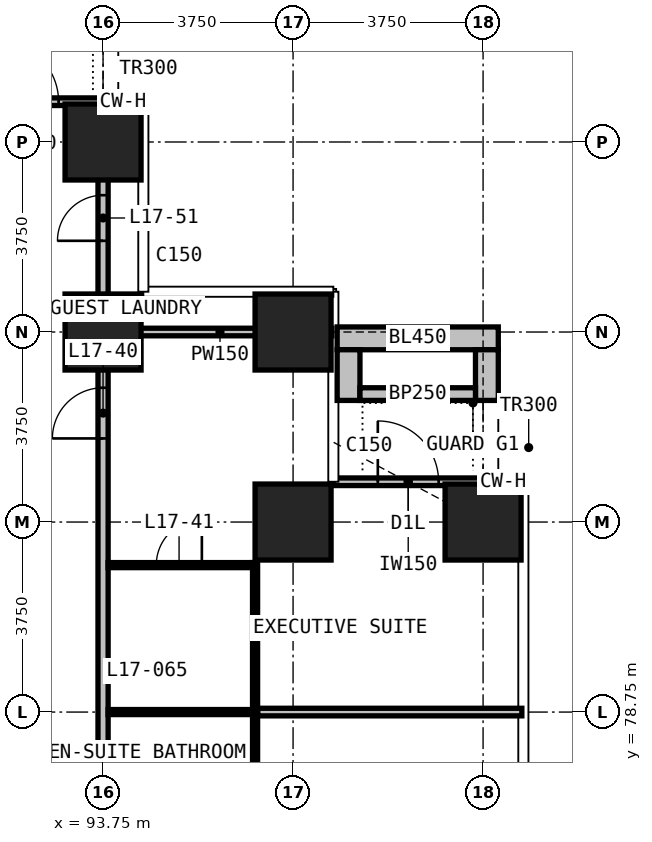
"""IFC4 building model, lengths in metres.
Left out: names, types, materials, properties, quantities, classifications, styles, units other than length and angle.
Written with IfcOpenShell. Run it as: python <this file> out.ifc"""

import sys

from ifc_helpers import new_model, si_unit, direction, frame, frame_2d, origin, origin_2d, place, context, subcontext, project, spatial, rectangle, extrude, element, fill, save


model = new_model("IFC4")
c1 = context("Model", 3, precision=1e-05, world=origin(), true_north=direction((0.0, 1.0)))
c2 = subcontext(c1, "Body", "Model", "MODEL_VIEW")
j1 = project(units=[si_unit("LENGTHUNIT", "METRE"), si_unit("PLANEANGLEUNIT", "RADIAN")], contexts=[c1])
p1 = place(None, origin())
s1 = spatial("IfcSite", under=j1, at=p1, CompositionType="ELEMENT")
p2 = place(p1, origin())
s2 = spatial("IfcBuilding", under=s1, at=p2, CompositionType="ELEMENT")
p3 = place(p2, frame((0.0, 0.0, 75.8)))
s3 = spatial("IfcBuildingStorey", under=s2, at=p3, CompositionType="ELEMENT", Elevation=75.8)
for number, where, z_axis, x_axis in (
    (1, (93.75, 86.25, 0.0), (0.0, 0.0, 1.0), (1.0, 0.0, 0.0)),
    (2, (93.75, 90.0, 0.0), (0.0, 0.0, 1.0), (1.0, 0.0, 0.0)),
    (3, (97.5, 82.5, 0.0), (0.0, 0.0, 1.0), (1.0, 0.0, 0.0)),
    (4, (97.5, 86.25, 0.0), (0.0, 0.0, 1.0), (1.0, 0.0, 0.0)),
    (5, (101.25, 82.5, 0.0), (0.0, 0.0, 1.0), (1.0, 0.0, 0.0)),
):
    element("IfcColumn", number, at=place(p3, frame(where, z_axis=z_axis, x_axis=x_axis)), inside=s3, PredefinedType="COLUMN", context=c2, shape_type="SweptSolid", body=[
        extrude(rectangle(XDim=1.5, YDim=1.5, at=origin_2d()), origin(), (0.0, 0.0, 1.0), 3.3),
    ])
p4 = place(p3, frame((98.295, 83.295, 0.0), z_axis=(0.0, 0.0, 1.0), x_axis=(1.0, 0.0, 0.0)))
e6 = element("IfcWall", 6, at=p4, inside=s3, PredefinedType="SOLIDWALL", context=c2, shape_type="SweptSolid", body=[
    extrude(rectangle(XDim=2.955, YDim=0.15, at=frame_2d((1.478, 0.0))), origin(), (0.0, 0.0, 1.0), 3.0),
])
p5 = place(p4, frame((0.877, 0.0, 0.0)))
e7 = element("IfcOpeningElement", 7, at=p5, cuts=e6, PredefinedType="OPENING", context=c2, shape_type="SweptSolid", body=[
    extrude(rectangle(XDim=1.2, YDim=2.0, at=frame_2d((0.6, 1.0))), frame((0.0, 0.085, 0.0), z_axis=(0.0, -1.0, 0.0), x_axis=(1.0, 0.0, 0.0)), (0.0, 0.0, 1.0), 0.17),
])
p6 = place(p3, frame((90.795, 90.795, 0.0), z_axis=(0.0, 0.0, 1.0), x_axis=(1.0, 0.0, 0.0)))
e8 = element("IfcWall", 8, at=p6, inside=s3, PredefinedType="SOLIDWALL", context=c2, shape_type="SweptSolid", body=[
    extrude(rectangle(XDim=2.955, YDim=0.15, at=frame_2d((1.478, 0.0))), origin(), (0.0, 0.0, 1.0), 3.0),
])
p7 = place(p6, frame((0.877, 0.0, 0.0)))
e9 = element("IfcOpeningElement", 9, at=p7, cuts=e8, PredefinedType="OPENING", context=c2, shape_type="SweptSolid", body=[
    extrude(rectangle(XDim=1.2, YDim=2.4, at=frame_2d((0.6, 1.2))), frame((0.0, 0.085, 0.0), z_axis=(0.0, -1.0, 0.0), x_axis=(1.0, 0.0, 0.0)), (0.0, 0.0, 1.0), 0.17),
])
p8 = place(p3, frame((98.37, 86.125, 0.0), z_axis=(0.0, 0.0, 1.0), x_axis=(1.0, 0.0, 0.0)))
e10 = element("IfcWall", 10, at=p8, inside=s3, PredefinedType="USERDEFINED", context=c2, shape_type="SweptSolid", body=[
    extrude(rectangle(XDim=3.18, YDim=0.45, at=frame_2d((1.59, 0.0))), origin(), (0.0, 0.0, 1.0), 1.1),
])
for number, where, z_axis, x_axis in (
    (11, (98.595, 84.9, 0.0), (0.0, 0.0, 1.0), (0.0, 1.0, 0.0)),
    (12, (101.325, 84.9, 0.0), (0.0, 0.0, 1.0), (0.0, 1.0, 0.0)),
):
    element("IfcWall", number, at=place(p3, frame(where, z_axis=z_axis, x_axis=x_axis)), inside=s3, PredefinedType="USERDEFINED", context=c2, shape_type="SweptSolid", body=[
        extrude(rectangle(XDim=1.0, YDim=0.45, at=frame_2d((0.5, 0.0))), origin(), (0.0, 0.0, 1.0), 1.1),
    ])
p9 = place(p3, frame((98.82, 85.025, 0.0), z_axis=(0.0, 0.0, 1.0), x_axis=(1.0, 0.0, 0.0)))
e13 = element("IfcWall", 13, at=p9, inside=s3, PredefinedType="USERDEFINED", context=c2, shape_type="SweptSolid", body=[
    extrude(rectangle(XDim=2.28, YDim=0.25, at=frame_2d((1.14, 0.0))), origin(), (0.0, 0.0, 1.0), 1.0),
])
p10 = place(p3, frame((93.75, 52.4, 0.0), z_axis=(0.0, 0.0, 1.0), x_axis=(0.0, 1.0, 0.0)))
e14 = element("IfcWall", 14, at=p10, inside=s3, PredefinedType="PARTITIONING", context=c2, shape_type="SweptSolid", body=[
    extrude(rectangle(XDim=38.31, YDim=0.2, at=frame_2d((19.155, 0.0))), origin(), (0.0, 0.0, 1.0), 3.0),
])
p11 = place(p10, frame((2.35, 0.0, 0.0)))
e15 = element("IfcOpeningElement", 15, at=p11, cuts=e14, PredefinedType="OPENING", context=c2, shape_type="SweptSolid", body=[
    extrude(rectangle(XDim=1.0, YDim=2.2, at=frame_2d((0.5, 1.1))), frame((0.0, 0.11, 0.0), z_axis=(0.0, -1.0, 0.0), x_axis=(1.0, 0.0, 0.0)), (0.0, 0.0, 1.0), 0.22),
])
p12 = place(p10, frame((4.95, 0.0, 0.0)))
e16 = element("IfcOpeningElement", 16, at=p12, cuts=e14, PredefinedType="OPENING", context=c2, shape_type="SweptSolid", body=[
    extrude(rectangle(XDim=1.0, YDim=2.2, at=frame_2d((0.5, 1.1))), frame((0.0, 0.11, 0.0), z_axis=(0.0, -1.0, 0.0), x_axis=(1.0, 0.0, 0.0)), (0.0, 0.0, 1.0), 0.22),
])
p13 = place(p10, frame((16.75, 0.0, 0.0)))
e17 = element("IfcOpeningElement", 17, at=p13, cuts=e14, PredefinedType="OPENING", context=c2, shape_type="SweptSolid", body=[
    extrude(rectangle(XDim=1.0, YDim=2.2, at=frame_2d((0.5, 1.1))), frame((0.0, 0.11, 0.0), z_axis=(0.0, -1.0, 0.0), x_axis=(1.0, 0.0, 0.0)), (0.0, 0.0, 1.0), 0.22),
])
p14 = place(p10, frame((19.95, 0.0, 0.0)))
e18 = element("IfcOpeningElement", 18, at=p14, cuts=e14, PredefinedType="OPENING", context=c2, shape_type="SweptSolid", body=[
    extrude(rectangle(XDim=1.0, YDim=2.2, at=frame_2d((0.5, 1.1))), frame((0.0, 0.11, 0.0), z_axis=(0.0, -1.0, 0.0), x_axis=(1.0, 0.0, 0.0)), (0.0, 0.0, 1.0), 0.22),
])
p15 = place(p10, frame((31.75, 0.0, 0.0)))
e19 = element("IfcOpeningElement", 19, at=p15, cuts=e14, PredefinedType="OPENING", context=c2, shape_type="SweptSolid", body=[
    extrude(rectangle(XDim=1.0, YDim=2.2, at=frame_2d((0.5, 1.1))), frame((0.0, 0.11, 0.0), z_axis=(0.0, -1.0, 0.0), x_axis=(1.0, 0.0, 0.0)), (0.0, 0.0, 1.0), 0.22),
])
p16 = place(p10, frame((35.65, 0.0, 0.0)))
e20 = element("IfcOpeningElement", 20, at=p16, cuts=e14, PredefinedType="OPENING", context=c2, shape_type="SweptSolid", body=[
    extrude(rectangle(XDim=0.9, YDim=2.2, at=frame_2d((0.45, 1.1))), frame((0.0, 0.11, 0.0), z_axis=(0.0, -1.0, 0.0), x_axis=(1.0, 0.0, 0.0)), (0.0, 0.0, 1.0), 0.22),
])
p17 = place(p3, frame((96.8, 78.75, 0.0), z_axis=(0.0, 0.0, 1.0), x_axis=(1.0, 0.0, 0.0)))
e21 = element("IfcWall", 21, at=p17, inside=s3, PredefinedType="PARTITIONING", context=c2, shape_type="SweptSolid", body=[
    extrude(rectangle(XDim=5.215, YDim=0.15, at=frame_2d((2.607, 0.0))), origin(), (0.0, 0.0, 1.0), 3.0),
])
p18 = place(p3, frame((93.85, 86.25, 0.0), z_axis=(0.0, 0.0, 1.0), x_axis=(1.0, 0.0, 0.0)))
e22 = element("IfcWall", 22, at=p18, inside=s3, PredefinedType="PARTITIONING", context=c2, shape_type="SweptSolid", body=[
    extrude(rectangle(XDim=4.415, YDim=0.15, at=frame_2d((2.208, 0.0))), origin(), (0.0, 0.0, 1.0), 3.0),
])
p19 = place(p3, frame((93.85, 78.75, 0.0), z_axis=(0.0, 0.0, 1.0), x_axis=(1.0, 0.0, 0.0)))
e23 = element("IfcWall", 23, at=p19, inside=s3, PredefinedType="PARTITIONING", context=c2, shape_type="SweptSolid", body=[
    extrude(rectangle(XDim=2.85, YDim=0.1, at=frame_2d((1.425, 0.0))), origin(), (0.0, 0.0, 1.0), 3.0),
])
p20 = place(p3, frame((93.85, 81.65, 0.0), z_axis=(0.0, 0.0, 1.0), x_axis=(1.0, 0.0, 0.0)))
e24 = element("IfcWall", 24, at=p20, inside=s3, PredefinedType="PARTITIONING", context=c2, shape_type="SweptSolid", body=[
    extrude(rectangle(XDim=2.85, YDim=0.1, at=frame_2d((1.425, 0.0))), origin(), (0.0, 0.0, 1.0), 3.0),
])
p21 = place(p20, frame((0.95, 0.0, 0.0)))
e25 = element("IfcOpeningElement", 25, at=p21, cuts=e24, PredefinedType="OPENING", context=c2, shape_type="SweptSolid", body=[
    extrude(rectangle(XDim=0.9, YDim=2.2, at=frame_2d((0.45, 1.1))), frame((0.0, 0.06, 0.0), z_axis=(0.0, -1.0, 0.0), x_axis=(1.0, 0.0, 0.0)), (0.0, 0.0, 1.0), 0.12),
])
p22 = place(p3, frame((96.75, 75.8, 0.0), z_axis=(0.0, 0.0, 1.0), x_axis=(0.0, 1.0, 0.0)))
e26 = element("IfcWall", 26, at=p22, inside=s3, PredefinedType="PARTITIONING", context=c2, shape_type="SweptSolid", body=[
    extrude(rectangle(XDim=5.9, YDim=0.1, at=frame_2d((2.95, 0.0))), origin(), (0.0, 0.0, 1.0), 3.0),
])
p23 = place(p5, origin())
e27 = element("IfcDoor", 27, at=p23, inside=s3, OperationType="SINGLE_SWING_LEFT", PredefinedType="DOOR", context=c2, shape_type="SweptSolid", body=[
    extrude(rectangle(XDim=1.2, YDim=2.0, at=frame_2d((0.6, 1.0))), frame((0.0, 0.025, 0.0), z_axis=(0.0, -1.0, 0.0), x_axis=(1.0, 0.0, 0.0)), (0.0, 0.0, 1.0), 0.05),
])
fill(e7, e27)
p24 = place(p7, origin())
e28 = element("IfcDoor", 28, at=p24, inside=s3, OperationType="SINGLE_SWING_LEFT", PredefinedType="DOOR", context=c2, shape_type="SweptSolid", body=[
    extrude(rectangle(XDim=1.2, YDim=2.4, at=frame_2d((0.6, 1.2))), frame((0.0, 0.025, 0.0), z_axis=(0.0, -1.0, 0.0), x_axis=(1.0, 0.0, 0.0)), (0.0, 0.0, 1.0), 0.05),
])
fill(e9, e28)
p25 = place(p15, origin())
e29 = element("IfcDoor", 29, at=p25, inside=s3, OperationType="SINGLE_SWING_LEFT", PredefinedType="DOOR", context=c2, shape_type="SweptSolid", body=[
    extrude(rectangle(XDim=1.0, YDim=2.2, at=frame_2d((0.5, 1.1))), frame((0.0, 0.025, 0.0), z_axis=(0.0, -1.0, 0.0), x_axis=(1.0, 0.0, 0.0)), (0.0, 0.0, 1.0), 0.05),
])
fill(e19, e29)
p26 = place(p21, origin())
e30 = element("IfcDoor", 30, at=p26, inside=s3, OperationType="SINGLE_SWING_RIGHT", PredefinedType="DOOR", context=c2, shape_type="SweptSolid", body=[
    extrude(rectangle(XDim=0.9, YDim=2.2, at=frame_2d((0.45, 1.1))), frame((0.0, 0.025, 0.0), z_axis=(0.0, -1.0, 0.0), x_axis=(1.0, 0.0, 0.0)), (0.0, 0.0, 1.0), 0.05),
])
fill(e25, e30)
p27 = place(p16, origin())
e31 = element("IfcDoor", 31, at=p27, inside=s3, OperationType="SINGLE_SWING_LEFT", PredefinedType="DOOR", context=c2, shape_type="SweptSolid", body=[
    extrude(rectangle(XDim=0.9, YDim=2.2, at=frame_2d((0.45, 1.1))), frame((0.0, 0.025, 0.0), z_axis=(0.0, -1.0, 0.0), x_axis=(1.0, 0.0, 0.0)), (0.0, 0.0, 1.0), 0.05),
])
fill(e20, e31)
save(model, sys.argv[1])
